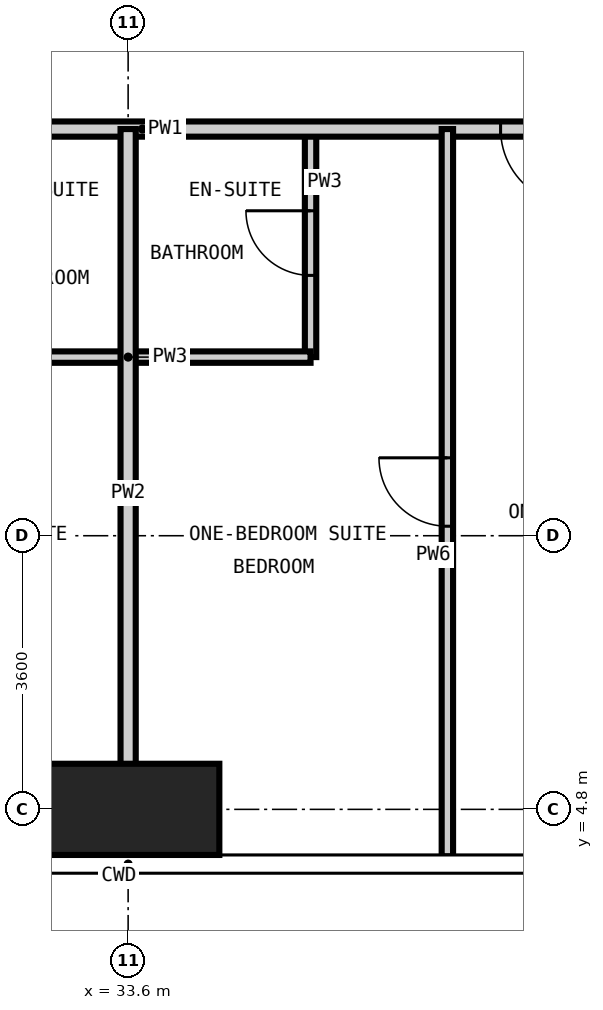
"""IFC4 building model, lengths in metres.
Left out: names, types, materials, properties, quantities, classifications, styles, units other than length and angle.
Written with IfcOpenShell. Run it as: python <this file> out.ifc"""

import sys

from ifc_helpers import new_model, si_unit, direction, frame, frame_2d, origin, origin_2d, place, context, subcontext, project, spatial, rectangle, extrude, element, fill, save


model = new_model("IFC4")
c1 = context("Model", 3, precision=1e-05, world=origin(), true_north=direction((0.0, 1.0)))
c2 = subcontext(c1, "Body", "Model", "MODEL_VIEW")
j1 = project(units=[si_unit("LENGTHUNIT", "METRE"), si_unit("PLANEANGLEUNIT", "RADIAN")], contexts=[c1])
p1 = place(None, origin())
s1 = spatial("IfcSite", under=j1, at=p1, CompositionType="ELEMENT")
p2 = place(p1, origin())
s2 = spatial("IfcBuilding", under=s1, at=p2, CompositionType="ELEMENT")
p3 = place(p2, frame((0.0, 0.0, 225.6)))
s3 = spatial("IfcBuildingStorey", under=s2, at=p3, CompositionType="ELEMENT", Elevation=225.6)
p4 = place(p3, frame((33.6, 4.8, -0.35), z_axis=(0.0, 0.0, 1.0), x_axis=(1.0, 0.0, 0.0)))
e1 = element("IfcColumn", 1, at=p4, inside=s3, PredefinedType="COLUMN", context=c2, shape_type="SweptSolid", body=[
    extrude(rectangle(XDim=2.4, YDim=1.2, at=origin_2d()), origin(), (0.0, 0.0, 1.0), 3.9),
])
p5 = place(p3, frame((36.0, 10.75, 0.0), z_axis=(0.0, 0.0, 1.0), x_axis=(0.0, 1.0, 0.0)))
e2 = element("IfcWall", 2, at=p5, inside=s3, PredefinedType="PARTITIONING", context=c2, shape_type="SweptSolid", body=[
    extrude(rectangle(XDim=3.0, YDim=0.15, at=frame_2d((1.5, 0.0))), origin(), (0.0, 0.0, 1.0), 3.55),
])
p6 = place(p5, frame((1.075, 0.0, 0.0)))
e3 = element("IfcOpeningElement", 3, at=p6, cuts=e2, PredefinedType="OPENING", context=c2, shape_type="SweptSolid", body=[
    extrude(rectangle(XDim=0.85, YDim=2.1, at=frame_2d((0.425, 1.05))), frame((0.0, 0.085, 0.0), z_axis=(0.0, -1.0, 0.0), x_axis=(1.0, 0.0, 0.0)), (0.0, 0.0, 1.0), 0.17),
])
p7 = place(p3, frame((31.2, 10.75, 0.0), z_axis=(0.0, 0.0, 1.0), x_axis=(1.0, 0.0, 0.0)))
e4 = element("IfcWall", 4, at=p7, inside=s3, PredefinedType="PARTITIONING", context=c2, shape_type="SweptSolid", body=[
    extrude(rectangle(XDim=4.8, YDim=0.15, at=frame_2d((2.4, 0.0))), origin(), (0.0, 0.0, 1.0), 3.55),
])
p8 = place(p3, frame((45.65, 13.75, 0.0), z_axis=(0.0, 0.0, 1.0), x_axis=(-1.0, 0.0, 0.0)))
e5 = element("IfcWall", 5, at=p8, inside=s3, PredefinedType="PARTITIONING", context=c2, shape_type="SweptSolid", body=[
    extrude(rectangle(XDim=23.725, YDim=0.2, at=frame_2d((11.862, 0.0))), origin(), (0.0, 0.0, 1.0), 3.55),
])
p9 = place(p8, frame((16.95, 0.0, 0.0)))
e6 = element("IfcOpeningElement", 6, at=p9, cuts=e5, PredefinedType="OPENING", context=c2, shape_type="SweptSolid", body=[
    extrude(rectangle(XDim=1.0, YDim=2.2, at=frame_2d((0.5, 1.1))), frame((0.0, 0.11, 0.0), z_axis=(0.0, -1.0, 0.0), x_axis=(1.0, 0.0, 0.0)), (0.0, 0.0, 1.0), 0.22),
])
p10 = place(p8, frame((6.15, 0.0, 0.0)))
e7 = element("IfcOpeningElement", 7, at=p10, cuts=e5, PredefinedType="OPENING", context=c2, shape_type="SweptSolid", body=[
    extrude(rectangle(XDim=1.0, YDim=2.2, at=frame_2d((0.5, 1.1))), frame((0.0, 0.11, 0.0), z_axis=(0.0, -1.0, 0.0), x_axis=(1.0, 0.0, 0.0)), (0.0, 0.0, 1.0), 0.22),
])
p11 = place(p3, frame((33.6, 4.182, 0.0), z_axis=(0.0, 0.0, 1.0), x_axis=(0.0, 1.0, 0.0)))
e8 = element("IfcWall", 8, at=p11, inside=s3, PredefinedType="PARTITIONING", context=c2, shape_type="SweptSolid", body=[
    extrude(rectangle(XDim=9.568, YDim=0.2, at=frame_2d((4.784, 0.0))), origin(), (0.0, 0.0, 1.0), 3.55),
])
p12 = place(p3, frame((37.8, 4.182, 0.0), z_axis=(0.0, 0.0, 1.0), x_axis=(0.0, 1.0, 0.0)))
e9 = element("IfcWall", 9, at=p12, inside=s3, PredefinedType="PARTITIONING", context=c2, shape_type="SweptSolid", body=[
    extrude(rectangle(XDim=9.568, YDim=0.15, at=frame_2d((4.784, 0.0))), origin(), (0.0, 0.0, 1.0), 3.55),
])
p13 = place(p12, frame((4.343, 0.0, 0.0)))
e10 = element("IfcOpeningElement", 10, at=p13, cuts=e9, PredefinedType="OPENING", context=c2, shape_type="SweptSolid", body=[
    extrude(rectangle(XDim=0.9, YDim=2.1, at=frame_2d((0.45, 1.05))), frame((0.0, 0.085, 0.0), z_axis=(0.0, -1.0, 0.0), x_axis=(1.0, 0.0, 0.0)), (0.0, 0.0, 1.0), 0.17),
])
p14 = place(p10, origin())
e11 = element("IfcDoor", 11, at=p14, inside=s3, OperationType="SINGLE_SWING_LEFT", PredefinedType="DOOR", context=c2, shape_type="SweptSolid", body=[
    extrude(rectangle(XDim=1.0, YDim=2.2, at=frame_2d((0.5, 1.1))), frame((0.0, 0.025, 0.0), z_axis=(0.0, -1.0, 0.0), x_axis=(1.0, 0.0, 0.0)), (0.0, 0.0, 1.0), 0.05),
])
fill(e7, e11)
p15 = place(p13, origin())
e12 = element("IfcDoor", 12, at=p15, inside=s3, OperationType="SINGLE_SWING_RIGHT", PredefinedType="DOOR", context=c2, shape_type="SweptSolid", body=[
    extrude(rectangle(XDim=0.9, YDim=2.1, at=frame_2d((0.45, 1.05))), frame((0.0, 0.025, 0.0), z_axis=(0.0, -1.0, 0.0), x_axis=(1.0, 0.0, 0.0)), (0.0, 0.0, 1.0), 0.05),
])
fill(e10, e12)
p16 = place(p6, origin())
e13 = element("IfcDoor", 13, at=p16, inside=s3, OperationType="SINGLE_SWING_RIGHT", PredefinedType="DOOR", context=c2, shape_type="SweptSolid", body=[
    extrude(rectangle(XDim=0.85, YDim=2.1, at=frame_2d((0.425, 1.05))), frame((0.0, 0.025, 0.0), z_axis=(0.0, -1.0, 0.0), x_axis=(1.0, 0.0, 0.0)), (0.0, 0.0, 1.0), 0.05),
])
fill(e3, e13)
save(model, sys.argv[1])
